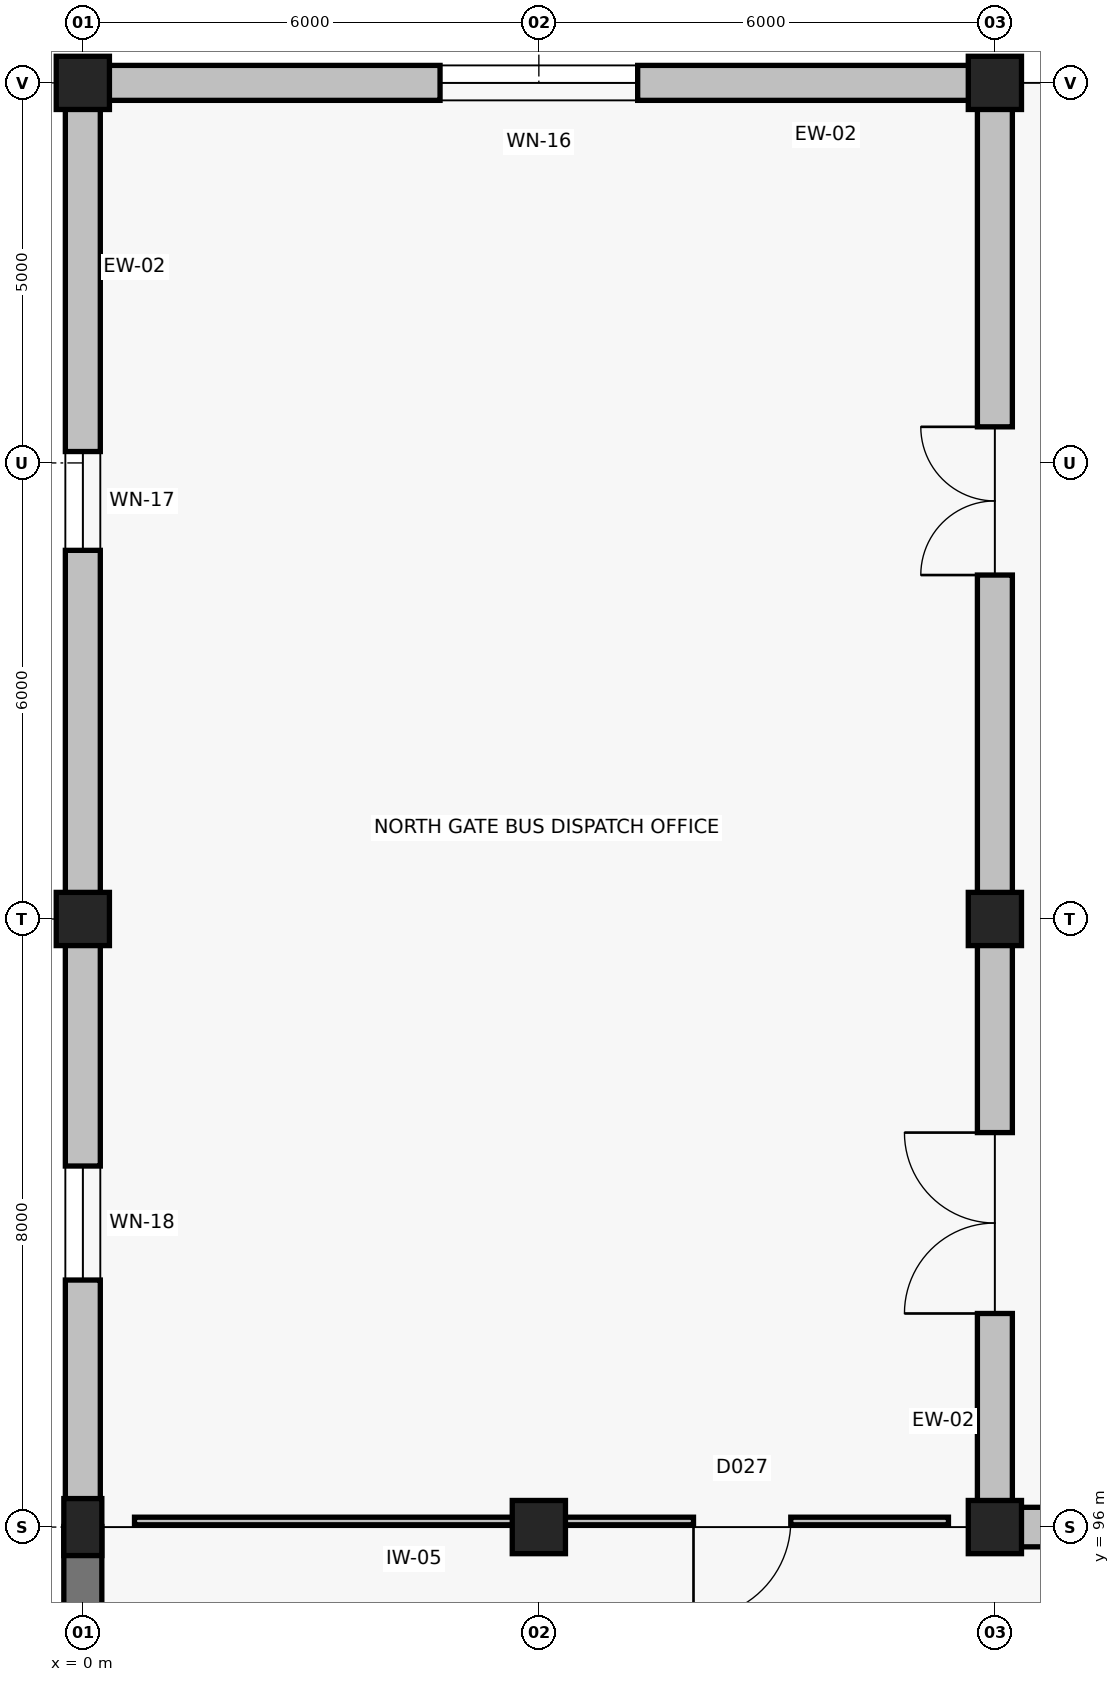
"""IFC4 building model, lengths in metres.
Left out: names, types, materials, properties, quantities, classifications, styles, units other than length and angle.
Written with IfcOpenShell. Run it as: python <this file> out.ifc"""

import sys

from ifc_helpers import new_model, si_unit, direction, frame, frame_2d, origin, origin_2d, place, context, subcontext, project, spatial, rectangle, extrude, element, fill, save


model = new_model("IFC4")
c1 = context("Model", 3, precision=1e-05, world=origin(), true_north=direction((0.0, 1.0)))
c2 = subcontext(c1, "Body", "Model", "MODEL_VIEW")
j1 = project(units=[si_unit("LENGTHUNIT", "METRE"), si_unit("PLANEANGLEUNIT", "RADIAN")], contexts=[c1])
p1 = place(None, origin())
s1 = spatial("IfcSite", under=j1, at=p1, CompositionType="ELEMENT")
p2 = place(p1, origin())
s2 = spatial("IfcBuilding", under=s1, at=p2, CompositionType="ELEMENT")
p3 = place(p2, origin())
s3 = spatial("IfcBuildingStorey", under=s2, at=p3, CompositionType="ELEMENT", Elevation=0.0)
p4 = place(p3, frame((0.0, 96.0, 0.0), z_axis=(0.0, 0.0, 1.0), x_axis=(1.0, 0.0, 0.0)))
e1 = element("IfcColumn", 1, at=p4, inside=s3, PredefinedType="PILASTER", context=c2, shape_type="SweptSolid", body=[
    extrude(rectangle(XDim=0.5, YDim=0.75, at=origin_2d()), origin(), (0.0, 0.0, 1.0), 6.6),
])
for number, where, z_axis, x_axis in (
    (2, (6.0, 96.0, 0.0), (0.0, 0.0, 1.0), (1.0, 0.0, 0.0)),
    (3, (12.0, 96.0, 0.0), (0.0, 0.0, 1.0), (1.0, 0.0, 0.0)),
    (4, (0.0, 104.0, 0.0), (0.0, 0.0, 1.0), (1.0, 0.0, 0.0)),
    (5, (12.0, 104.0, 0.0), (0.0, 0.0, 1.0), (1.0, 0.0, 0.0)),
    (6, (0.0, 115.0, 0.0), (0.0, 0.0, 1.0), (1.0, 0.0, 0.0)),
    (7, (12.0, 115.0, 0.0), (0.0, 0.0, 1.0), (1.0, 0.0, 0.0)),
):
    element("IfcColumn", number, at=place(p3, frame(where, z_axis=z_axis, x_axis=x_axis)), inside=s3, PredefinedType="COLUMN", context=c2, shape_type="SweptSolid", body=[
        extrude(rectangle(XDim=0.7, YDim=0.7, at=origin_2d()), origin(), (0.0, 0.0, 1.0), 6.6),
    ])
p5 = place(p3, frame((0.0, -0.008, 0.0), z_axis=(0.0, 0.0, 1.0), x_axis=(0.0, 1.0, 0.0)))
e8 = element("IfcWall", 8, at=p5, inside=s3, PredefinedType="SOLIDWALL", context=c2, shape_type="SweptSolid", body=[
    extrude(rectangle(XDim=96.016, YDim=0.5, at=frame_2d((48.008, 0.0))), origin(), (0.0, 0.0, 1.0), 6.32),
])
p6 = place(p3, frame((18.008, 96.0, 0.0), z_axis=(0.0, 0.0, 1.0), x_axis=(-1.0, 0.0, 0.0)))
e9 = element("IfcWall", 9, at=p6, inside=s3, PredefinedType="SOLIDWALL", context=c2, shape_type="SweptSolid", body=[
    extrude(rectangle(XDim=6.258, YDim=0.52, at=frame_2d((3.129, 0.0))), origin(), (0.0, 0.0, 1.0), 5.607),
])
p7 = place(p6, frame((1.959, 0.0, 0.0)))
e10 = element("IfcOpeningElement", 10, at=p7, cuts=e9, PredefinedType="OPENING", context=c2, shape_type="SweptSolid", body=[
    extrude(rectangle(XDim=2.34, YDim=2.75, at=frame_2d((1.17, 1.375))), frame((0.0, 0.275, 0.0), z_axis=(0.0, -1.0, 0.0), x_axis=(1.0, 0.0, 0.0)), (0.0, 0.0, 1.0), 0.55),
])
p8 = place(p3, frame((12.0, 95.992, 0.0), z_axis=(0.0, 0.0, 1.0), x_axis=(0.0, 1.0, 0.0)))
e11 = element("IfcWall", 11, at=p8, inside=s3, PredefinedType="SOLIDWALL", context=c2, shape_type="SweptSolid", body=[
    extrude(rectangle(XDim=8.016, YDim=0.46, at=frame_2d((4.008, 0.0))), origin(), (0.0, 0.0, 1.0), 5.607),
])
p9 = place(p8, frame((2.818, 0.0, 0.0)))
e12 = element("IfcOpeningElement", 12, at=p9, cuts=e11, PredefinedType="OPENING", context=c2, shape_type="SweptSolid", body=[
    extrude(rectangle(XDim=2.38, YDim=2.85, at=frame_2d((1.19, 1.425))), frame((0.0, 0.245, 0.0), z_axis=(0.0, -1.0, 0.0), x_axis=(1.0, 0.0, 0.0)), (0.0, 0.0, 1.0), 0.49),
])
p10 = place(p3, frame((12.0, 103.992, 0.0), z_axis=(0.0, 0.0, 1.0), x_axis=(0.0, 1.0, 0.0)))
e13 = element("IfcWall", 13, at=p10, inside=s3, PredefinedType="SOLIDWALL", context=c2, shape_type="SweptSolid", body=[
    extrude(rectangle(XDim=11.016, YDim=0.46, at=frame_2d((5.508, 0.0))), origin(), (0.0, 0.0, 1.0), 6.32),
])
p11 = place(p10, frame((4.533, 0.0, 0.0)))
e14 = element("IfcOpeningElement", 14, at=p11, cuts=e13, PredefinedType="OPENING", context=c2, shape_type="SweptSolid", body=[
    extrude(rectangle(XDim=1.95, YDim=2.4, at=frame_2d((0.975, 1.2))), frame((0.0, 0.245, 0.0), z_axis=(0.0, -1.0, 0.0), x_axis=(1.0, 0.0, 0.0)), (0.0, 0.0, 1.0), 0.49),
])
p12 = place(p3, frame((12.25, 115.0, 0.0), z_axis=(0.0, 0.0, 1.0), x_axis=(-1.0, 0.0, 0.0)))
e15 = element("IfcWall", 15, at=p12, inside=s3, PredefinedType="SOLIDWALL", context=c2, shape_type="SweptSolid", body=[
    extrude(rectangle(XDim=12.5, YDim=0.46, at=frame_2d((6.25, 0.0))), origin(), (0.0, 0.0, 1.0), 6.32),
])
p13 = place(p12, frame((4.95, 0.0, 0.9)))
e16 = element("IfcOpeningElement", 16, at=p13, cuts=e15, PredefinedType="OPENING", context=c2, shape_type="SweptSolid", body=[
    extrude(rectangle(XDim=2.6, YDim=2.1, at=frame_2d((1.3, 1.05))), frame((0.0, 0.245, 0.0), z_axis=(0.0, -1.0, 0.0), x_axis=(1.0, 0.0, 0.0)), (0.0, 0.0, 1.0), 0.49),
])
p14 = place(p3, frame((0.0, 115.008, 0.0), z_axis=(0.0, 0.0, 1.0), x_axis=(0.0, -1.0, 0.0)))
e17 = element("IfcWall", 17, at=p14, inside=s3, PredefinedType="SOLIDWALL", context=c2, shape_type="SweptSolid", body=[
    extrude(rectangle(XDim=11.016, YDim=0.46, at=frame_2d((5.508, 0.0))), origin(), (0.0, 0.0, 1.0), 6.32),
])
p15 = place(p14, frame((4.858, 0.0, 0.9)))
e18 = element("IfcOpeningElement", 18, at=p15, cuts=e17, PredefinedType="OPENING", context=c2, shape_type="SweptSolid", body=[
    extrude(rectangle(XDim=1.3, YDim=2.4, at=frame_2d((0.65, 1.2))), frame((0.0, 0.245, 0.0), z_axis=(0.0, -1.0, 0.0), x_axis=(1.0, 0.0, 0.0)), (0.0, 0.0, 1.0), 0.49),
])
p16 = place(p3, frame((0.0, 104.008, 0.0), z_axis=(0.0, 0.0, 1.0), x_axis=(0.0, -1.0, 0.0)))
e19 = element("IfcWall", 19, at=p16, inside=s3, PredefinedType="SOLIDWALL", context=c2, shape_type="SweptSolid", body=[
    extrude(rectangle(XDim=8.016, YDim=0.46, at=frame_2d((4.008, 0.0))), origin(), (0.0, 0.0, 1.0), 5.607),
])
p17 = place(p16, frame((3.258, 0.0, 0.9)))
e20 = element("IfcOpeningElement", 20, at=p17, cuts=e19, PredefinedType="OPENING", context=c2, shape_type="SweptSolid", body=[
    extrude(rectangle(XDim=1.5, YDim=2.4, at=frame_2d((0.75, 1.2))), frame((0.0, 0.245, 0.0), z_axis=(0.0, -1.0, 0.0), x_axis=(1.0, 0.0, 0.0)), (0.0, 0.0, 1.0), 0.49),
])
p18 = place(p3, frame((11.389, 96.08, 0.0), z_axis=(0.0, 0.0, 1.0), x_axis=(-1.0, 0.0, 0.0)))
e21 = element("IfcWall", 21, at=p18, inside=s3, PredefinedType="PARTITIONING", context=c2, shape_type="SweptSolid", body=[
    extrude(rectangle(XDim=10.709, YDim=0.1, at=frame_2d((5.354, 0.0))), origin(), (0.0, 0.0, 1.0), 5.607),
])
p19 = place(p18, frame((2.074, 0.0, 0.0)))
e22 = element("IfcOpeningElement", 22, at=p19, cuts=e21, PredefinedType="OPENING", context=c2, shape_type="SweptSolid", body=[
    extrude(rectangle(XDim=1.28, YDim=2.2, at=frame_2d((0.64, 1.1))), frame((0.0, 0.065, 0.0), z_axis=(0.0, -1.0, 0.0), x_axis=(1.0, 0.0, 0.0)), (0.0, 0.0, 1.0), 0.13),
])
p20 = place(p9, origin())
e23 = element("IfcDoor", 23, at=p20, inside=s3, OperationType="DOUBLE_DOOR_SINGLE_SWING", PredefinedType="DOOR", context=c2, shape_type="SweptSolid", body=[
    extrude(rectangle(XDim=2.38, YDim=2.85, at=frame_2d((1.19, 1.425))), frame((0.0, 0.025, 0.0), z_axis=(0.0, -1.0, 0.0), x_axis=(1.0, 0.0, 0.0)), (0.0, 0.0, 1.0), 0.05),
])
fill(e12, e23)
p21 = place(p11, origin())
e24 = element("IfcDoor", 24, at=p21, inside=s3, OperationType="DOUBLE_DOOR_SINGLE_SWING", PredefinedType="DOOR", context=c2, shape_type="SweptSolid", body=[
    extrude(rectangle(XDim=1.95, YDim=2.4, at=frame_2d((0.975, 1.2))), frame((0.0, 0.025, 0.0), z_axis=(0.0, -1.0, 0.0), x_axis=(1.0, 0.0, 0.0)), (0.0, 0.0, 1.0), 0.05),
])
fill(e14, e24)
p22 = place(p13, origin())
e25 = element("IfcWindow", 25, at=p22, inside=s3, PartitioningType="SINGLE_PANEL", PredefinedType="WINDOW", context=c2, shape_type="SweptSolid", body=[
    extrude(rectangle(XDim=2.6, YDim=2.1, at=frame_2d((1.3, 1.05))), frame((0.0, 0.03, 0.0), z_axis=(0.0, -1.0, 0.0), x_axis=(1.0, 0.0, 0.0)), (0.0, 0.0, 1.0), 0.06),
])
fill(e16, e25)
p23 = place(p15, origin())
e26 = element("IfcWindow", 26, at=p23, inside=s3, PartitioningType="SINGLE_PANEL", PredefinedType="WINDOW", context=c2, shape_type="SweptSolid", body=[
    extrude(rectangle(XDim=1.3, YDim=2.4, at=frame_2d((0.65, 1.2))), frame((0.0, 0.03, 0.0), z_axis=(0.0, -1.0, 0.0), x_axis=(1.0, 0.0, 0.0)), (0.0, 0.0, 1.0), 0.06),
])
fill(e18, e26)
p24 = place(p17, origin())
e27 = element("IfcWindow", 27, at=p24, inside=s3, PartitioningType="SINGLE_PANEL", PredefinedType="WINDOW", context=c2, shape_type="SweptSolid", body=[
    extrude(rectangle(XDim=1.5, YDim=2.4, at=frame_2d((0.75, 1.2))), frame((0.0, 0.03, 0.0), z_axis=(0.0, -1.0, 0.0), x_axis=(1.0, 0.0, 0.0)), (0.0, 0.0, 1.0), 0.06),
])
fill(e20, e27)
p25 = place(p19, origin())
e28 = element("IfcDoor", 28, at=p25, inside=s3, OperationType="SINGLE_SWING_RIGHT", PredefinedType="DOOR", context=c2, shape_type="SweptSolid", body=[
    extrude(rectangle(XDim=1.28, YDim=2.2, at=frame_2d((0.64, 1.1))), frame((0.0, 0.025, 0.0), z_axis=(0.0, -1.0, 0.0), x_axis=(1.0, 0.0, 0.0)), (0.0, 0.0, 1.0), 0.05),
])
fill(e22, e28)
save(model, sys.argv[1])
